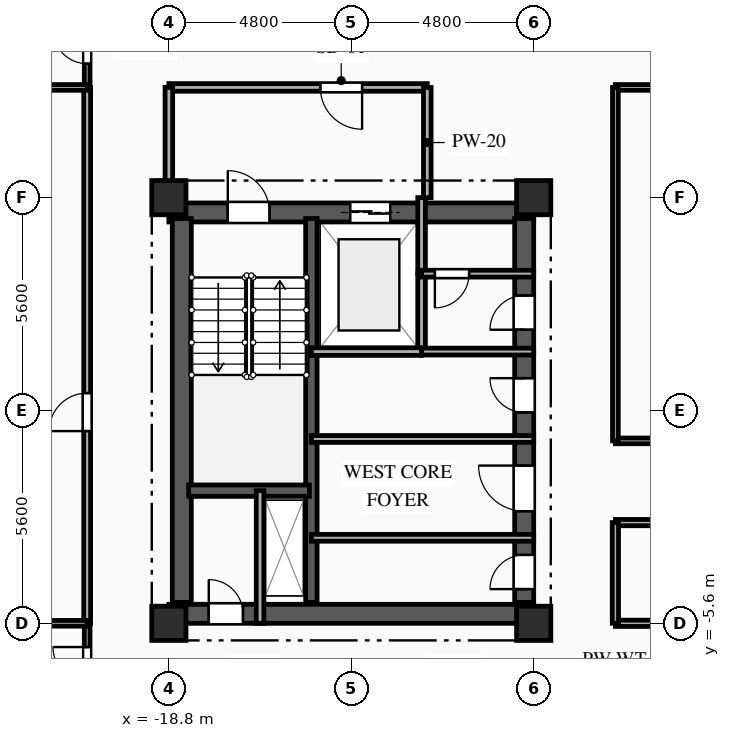
"""IFC4 building model, lengths in metres.
Left out: names, types, materials, properties, quantities, classifications, styles, units other than length and angle.
Written with IfcOpenShell. Run it as: python <this file> out.ifc"""

import sys

from ifc_helpers import new_model, si_unit, direction, frame, frame_2d, origin, origin_2d, place, context, subcontext, project, spatial, rectangle, extrude, element, fill, save


model = new_model("IFC4")
c1 = context("Model", 3, precision=1e-05, world=origin(), true_north=direction((0.0, 1.0)))
c2 = subcontext(c1, "Body", "Model", "MODEL_VIEW")
j1 = project(units=[si_unit("LENGTHUNIT", "METRE"), si_unit("PLANEANGLEUNIT", "RADIAN")], contexts=[c1])
p1 = place(None, origin())
s1 = spatial("IfcSite", under=j1, at=p1, CompositionType="ELEMENT")
p2 = place(p1, origin())
s2 = spatial("IfcBuilding", under=s1, at=p2, CompositionType="ELEMENT")
p3 = place(p2, frame((0.0, 0.0, 147.75)))
s3 = spatial("IfcBuildingStorey", under=s2, at=p3, CompositionType="ELEMENT", Elevation=147.75)
for number, where, z_axis, x_axis in (
    (1, (-18.8, -5.6, 0.0), (0.0, 0.0, 1.0), (1.0, 0.0, 0.0)),
    (2, (-18.8, 5.6, 0.0), (0.0, 0.0, 1.0), (1.0, 0.0, 0.0)),
    (3, (-9.2, -5.6, 0.0), (0.0, 0.0, 1.0), (1.0, 0.0, 0.0)),
    (4, (-9.2, 5.6, 0.0), (0.0, 0.0, 1.0), (1.0, 0.0, 0.0)),
):
    element("IfcColumn", number, at=place(p3, frame(where, z_axis=z_axis, x_axis=x_axis)), inside=s3, PredefinedType="COLUMN", context=c2, shape_type="SweptSolid", body=[
        extrude(rectangle(XDim=0.9, YDim=0.9, at=origin_2d()), origin(), (0.0, 0.0, 1.0), 3.35),
    ])
p4 = place(p3, frame((-18.8, 5.21, 0.0), z_axis=(0.0, 0.0, 1.0), x_axis=(1.0, 0.0, 0.0)))
e5 = element("IfcWall", 5, at=p4, inside=s3, PredefinedType="SHEAR", context=c2, shape_type="SweptSolid", body=[
    extrude(rectangle(XDim=9.6, YDim=0.5, at=frame_2d((4.8, 0.0))), origin(), (0.0, 0.0, 1.0), 3.04),
])
p5 = place(p4, frame((1.55, 0.0, 0.0)))
e6 = element("IfcOpeningElement", 6, at=p5, cuts=e5, PredefinedType="OPENING", context=c2, shape_type="SweptSolid", body=[
    extrude(rectangle(XDim=1.1, YDim=2.15, at=frame_2d((0.55, 1.075))), frame((0.0, 0.26, 0.0), z_axis=(0.0, -1.0, 0.0), x_axis=(1.0, 0.0, 0.0)), (0.0, 0.0, 1.0), 0.52),
])
p6 = place(p4, frame((4.775, 0.0, 0.0)))
e7 = element("IfcOpeningElement", 7, at=p6, cuts=e5, PredefinedType="OPENING", context=c2, shape_type="SweptSolid", body=[
    extrude(rectangle(XDim=1.05, YDim=2.1, at=frame_2d((0.525, 1.05))), frame((0.0, 0.26, 0.0), z_axis=(0.0, -1.0, 0.0), x_axis=(1.0, 0.0, 0.0)), (0.0, 0.0, 1.0), 0.52),
])
p7 = place(p3, frame((-18.8, -5.35, 0.0), z_axis=(0.0, 0.0, 1.0), x_axis=(1.0, 0.0, 0.0)))
e8 = element("IfcWall", 8, at=p7, inside=s3, PredefinedType="SHEAR", context=c2, shape_type="SweptSolid", body=[
    extrude(rectangle(XDim=9.6, YDim=0.5, at=frame_2d((4.8, 0.0))), origin(), (0.0, 0.0, 1.0), 3.04),
])
p8 = place(p7, frame((1.05, 0.0, 0.0)))
e9 = element("IfcOpeningElement", 9, at=p8, cuts=e8, PredefinedType="OPENING", context=c2, shape_type="SweptSolid", body=[
    extrude(rectangle(XDim=0.9, YDim=2.1, at=frame_2d((0.45, 1.05))), frame((0.0, 0.26, 0.0), z_axis=(0.0, -1.0, 0.0), x_axis=(1.0, 0.0, 0.0)), (0.0, 0.0, 1.0), 0.52),
])
p9 = place(p3, frame((-18.46, -5.05, 0.0), z_axis=(0.0, 0.0, 1.0), x_axis=(0.0, 1.0, 0.0)))
e10 = element("IfcWall", 10, at=p9, inside=s3, PredefinedType="SHEAR", context=c2, shape_type="SweptSolid", body=[
    extrude(rectangle(XDim=10.1, YDim=0.5, at=frame_2d((5.05, 0.0))), origin(), (0.0, 0.0, 1.0), 3.04),
])
p10 = place(p3, frame((-9.45, -5.05, 0.0), z_axis=(0.0, 0.0, 1.0), x_axis=(0.0, 1.0, 0.0)))
e11 = element("IfcWall", 11, at=p10, inside=s3, PredefinedType="SHEAR", context=c2, shape_type="SweptSolid", body=[
    extrude(rectangle(XDim=10.1, YDim=0.5, at=frame_2d((5.05, 0.0))), origin(), (0.0, 0.0, 1.0), 3.04),
])
p11 = place(p10, frame((7.175, 0.0, 0.0)))
e12 = element("IfcOpeningElement", 12, at=p11, cuts=e11, PredefinedType="OPENING", context=c2, shape_type="SweptSolid", body=[
    extrude(rectangle(XDim=0.9, YDim=2.1, at=frame_2d((0.45, 1.05))), frame((0.0, 0.26, 0.0), z_axis=(0.0, -1.0, 0.0), x_axis=(1.0, 0.0, 0.0)), (0.0, 0.0, 1.0), 0.52),
])
p12 = place(p10, frame((2.4, 0.0, 0.0)))
e13 = element("IfcOpeningElement", 13, at=p12, cuts=e11, PredefinedType="OPENING", context=c2, shape_type="SweptSolid", body=[
    extrude(rectangle(XDim=1.2, YDim=2.15, at=frame_2d((0.6, 1.075))), frame((0.0, 0.26, 0.0), z_axis=(0.0, -1.0, 0.0), x_axis=(1.0, 0.0, 0.0)), (0.0, 0.0, 1.0), 0.52),
])
p13 = place(p10, frame((0.35, 0.0, 0.0)))
e14 = element("IfcOpeningElement", 14, at=p13, cuts=e11, PredefinedType="OPENING", context=c2, shape_type="SweptSolid", body=[
    extrude(rectangle(XDim=0.9, YDim=2.1, at=frame_2d((0.45, 1.05))), frame((0.0, 0.26, 0.0), z_axis=(0.0, -1.0, 0.0), x_axis=(1.0, 0.0, 0.0)), (0.0, 0.0, 1.0), 0.52),
])
p14 = place(p10, frame((5.0, 0.0, 0.0)))
e15 = element("IfcOpeningElement", 15, at=p14, cuts=e11, PredefinedType="OPENING", context=c2, shape_type="SweptSolid", body=[
    extrude(rectangle(XDim=0.9, YDim=2.1, at=frame_2d((0.45, 1.05))), frame((0.0, 0.26, 0.0), z_axis=(0.0, -1.0, 0.0), x_axis=(1.0, 0.0, 0.0)), (0.0, 0.0, 1.0), 0.52),
])
p15 = place(p3, frame((-15.05, -5.05, 0.0), z_axis=(0.0, 0.0, 1.0), x_axis=(0.0, 1.0, 0.0)))
e16 = element("IfcWall", 16, at=p15, inside=s3, PredefinedType="SHEAR", context=c2, shape_type="SweptSolid", body=[
    extrude(rectangle(XDim=10.1, YDim=0.3, at=frame_2d((5.05, 0.0))), origin(), (0.0, 0.0, 1.0), 3.04),
])
p16 = place(p3, frame((-18.28, -2.11, 0.0), z_axis=(0.0, 0.0, 1.0), x_axis=(1.0, 0.0, 0.0)))
e17 = element("IfcWall", 17, at=p16, inside=s3, PredefinedType="SHEAR", context=c2, shape_type="SweptSolid", body=[
    extrude(rectangle(XDim=3.18, YDim=0.3, at=frame_2d((1.59, 0.0))), origin(), (0.0, 0.0, 1.0), 3.04),
])
p17 = place(p3, frame((-16.4, -5.6, 0.0), z_axis=(0.0, 0.0, 1.0), x_axis=(0.0, 1.0, 0.0)))
e18 = element("IfcWall", 18, at=p17, inside=s3, PredefinedType="PARTITIONING", context=c2, shape_type="SweptSolid", body=[
    extrude(rectangle(XDim=3.49, YDim=0.2, at=frame_2d((1.745, 0.0))), origin(), (0.0, 0.0, 1.0), 3.04),
])
p18 = place(p3, frame((-12.15, 1.55, 0.0), z_axis=(0.0, 0.0, 1.0), x_axis=(0.0, 1.0, 0.0)))
e19 = element("IfcWall", 19, at=p18, inside=s3, PredefinedType="PARTITIONING", context=c2, shape_type="SweptSolid", body=[
    extrude(rectangle(XDim=2.05, YDim=0.2, at=frame_2d((1.025, 0.0))), origin(), (0.0, 0.0, 1.0), 3.04),
])
p19 = place(p3, frame((-12.15, 3.6, 0.0), z_axis=(0.0, 0.0, 1.0), x_axis=(0.0, 1.0, 0.0)))
e20 = element("IfcWall", 20, at=p19, inside=s3, PredefinedType="PARTITIONING", context=c2, shape_type="SweptSolid", body=[
    extrude(rectangle(XDim=2.0, YDim=0.2, at=frame_2d((1.0, 0.0))), origin(), (0.0, 0.0, 1.0), 3.04),
])
p20 = place(p3, frame((-12.0, 8.5, 0.0), z_axis=(0.0, 0.0, 1.0), x_axis=(-1.0, 0.0, 0.0)))
e21 = element("IfcWall", 21, at=p20, inside=s3, PredefinedType="PARTITIONING", context=c2, shape_type="SweptSolid", body=[
    extrude(rectangle(XDim=6.8, YDim=0.2, at=frame_2d((3.4, 0.0))), origin(), (0.0, 0.0, 1.0), 3.04),
])
p21 = place(p20, frame((1.715, 0.0, 0.0)))
e22 = element("IfcOpeningElement", 22, at=p21, cuts=e21, PredefinedType="OPENING", context=c2, shape_type="SweptSolid", body=[
    extrude(rectangle(XDim=1.1, YDim=2.15, at=frame_2d((0.55, 1.075))), frame((0.0, 0.11, 0.0), z_axis=(0.0, -1.0, 0.0), x_axis=(1.0, 0.0, 0.0)), (0.0, 0.0, 1.0), 0.22),
])
p22 = place(p3, frame((-18.8, 8.5, 0.0), z_axis=(0.0, 0.0, 1.0), x_axis=(0.0, -1.0, 0.0)))
e23 = element("IfcWall", 23, at=p22, inside=s3, PredefinedType="PARTITIONING", context=c2, shape_type="SweptSolid", body=[
    extrude(rectangle(XDim=2.9, YDim=0.2, at=frame_2d((1.45, 0.0))), origin(), (0.0, 0.0, 1.0), 2.525),
])
p23 = place(p3, frame((-12.0, 5.6, 0.0), z_axis=(0.0, 0.0, 1.0), x_axis=(0.0, 1.0, 0.0)))
e24 = element("IfcWall", 24, at=p23, inside=s3, PredefinedType="PARTITIONING", context=c2, shape_type="SweptSolid", body=[
    extrude(rectangle(XDim=2.9, YDim=0.2, at=frame_2d((1.45, 0.0))), origin(), (0.0, 0.0, 1.0), 3.04),
])
p24 = place(p3, frame((-9.2, 3.6, 0.0), z_axis=(0.0, 0.0, 1.0), x_axis=(-1.0, 0.0, 0.0)))
e25 = element("IfcWall", 25, at=p24, inside=s3, PredefinedType="PARTITIONING", context=c2, shape_type="SweptSolid", body=[
    extrude(rectangle(XDim=2.95, YDim=0.18, at=frame_2d((1.475, 0.0))), origin(), (0.0, 0.0, 1.0), 3.04),
])
p25 = place(p24, frame((1.7, 0.0, 0.0)))
e26 = element("IfcOpeningElement", 26, at=p25, cuts=e25, PredefinedType="OPENING", context=c2, shape_type="SweptSolid", body=[
    extrude(rectangle(XDim=0.9, YDim=2.1, at=frame_2d((0.45, 1.05))), frame((0.0, 0.1, 0.0), z_axis=(0.0, -1.0, 0.0), x_axis=(1.0, 0.0, 0.0)), (0.0, 0.0, 1.0), 0.2),
])
p26 = place(p3, frame((-12.15, 1.55, 0.0), z_axis=(0.0, 0.0, 1.0), x_axis=(1.0, 0.0, 0.0)))
e27 = element("IfcWall", 27, at=p26, inside=s3, PredefinedType="PARTITIONING", context=c2, shape_type="SweptSolid", body=[
    extrude(rectangle(XDim=2.95, YDim=0.18, at=frame_2d((1.475, 0.0))), origin(), (0.0, 0.0, 1.0), 3.04),
])
p27 = place(p3, frame((-15.05, -3.35, 0.0), z_axis=(0.0, 0.0, 1.0), x_axis=(1.0, 0.0, 0.0)))
e28 = element("IfcWall", 28, at=p27, inside=s3, PredefinedType="PARTITIONING", context=c2, shape_type="SweptSolid", body=[
    extrude(rectangle(XDim=5.85, YDim=0.18, at=frame_2d((2.925, 0.0))), origin(), (0.0, 0.0, 1.0), 2.755),
])
p28 = place(p3, frame((-9.2, -0.75, 0.0), z_axis=(0.0, 0.0, 1.0), x_axis=(-1.0, 0.0, 0.0)))
e29 = element("IfcWall", 29, at=p28, inside=s3, PredefinedType="PARTITIONING", context=c2, shape_type="SweptSolid", body=[
    extrude(rectangle(XDim=5.85, YDim=0.18, at=frame_2d((2.925, 0.0))), origin(), (0.0, 0.0, 1.0), 3.04),
])
p29 = place(p3, frame((-20.95, 8.5, 0.0), z_axis=(0.0, 0.0, 1.0), x_axis=(0.0, 1.0, 0.0)))
e30 = element("IfcWall", 30, at=p29, inside=s3, PredefinedType="PARTITIONING", context=c2, shape_type="SweptSolid", body=[
    extrude(rectangle(XDim=2.15, YDim=0.15, at=frame_2d((1.075, 0.0))), origin(), (0.0, 0.0, 1.0), 3.04),
])
p30 = place(p29, frame((0.625, 0.0, 0.0)))
e31 = element("IfcOpeningElement", 31, at=p30, cuts=e30, PredefinedType="OPENING", context=c2, shape_type="SweptSolid", body=[
    extrude(rectangle(XDim=0.9, YDim=2.1, at=frame_2d((0.45, 1.05))), frame((0.0, 0.085, 0.0), z_axis=(0.0, -1.0, 0.0), x_axis=(1.0, 0.0, 0.0)), (0.0, 0.0, 1.0), 0.17),
])
p31 = place(p3, frame((0.0, 8.5, 0.0), z_axis=(0.0, 0.0, 1.0), x_axis=(-1.0, 0.0, 0.0)))
e32 = element("IfcWall", 32, at=p31, inside=s3, PredefinedType="PARTITIONING", context=c2, shape_type="SweptSolid", body=[
    extrude(rectangle(XDim=7.05, YDim=0.15, at=frame_2d((3.525, 0.0))), origin(), (0.0, 0.0, 1.0), 3.04),
])
p32 = place(p3, frame((-20.95, -7.75, 0.0), z_axis=(0.0, 0.0, 1.0), x_axis=(0.0, 1.0, 0.0)))
e33 = element("IfcWall", 33, at=p32, inside=s3, PredefinedType="PARTITIONING", context=c2, shape_type="SweptSolid", body=[
    extrude(rectangle(XDim=2.15, YDim=0.15, at=frame_2d((1.075, 0.0))), origin(), (0.0, 0.0, 1.0), 3.04),
])
p33 = place(p32, frame((0.625, 0.0, 0.0)))
e34 = element("IfcOpeningElement", 34, at=p33, cuts=e33, PredefinedType="OPENING", context=c2, shape_type="SweptSolid", body=[
    extrude(rectangle(XDim=0.9, YDim=2.1, at=frame_2d((0.45, 1.05))), frame((0.0, 0.085, 0.0), z_axis=(0.0, -1.0, 0.0), x_axis=(1.0, 0.0, 0.0)), (0.0, 0.0, 1.0), 0.17),
])
p34 = place(p3, frame((-7.05, -5.6, 0.0), z_axis=(0.0, 0.0, 1.0), x_axis=(1.0, 0.0, 0.0)))
e35 = element("IfcWall", 35, at=p34, inside=s3, PredefinedType="PARTITIONING", context=c2, shape_type="SweptSolid", body=[
    extrude(rectangle(XDim=7.05, YDim=0.165, at=frame_2d((3.525, 0.0))), origin(), (0.0, 0.0, 1.0), 2.525),
])
p35 = place(p3, frame((-20.95, -5.6, 0.0), z_axis=(0.0, 0.0, 1.0), x_axis=(0.0, 1.0, 0.0)))
e36 = element("IfcWall", 36, at=p35, inside=s3, PredefinedType="PARTITIONING", context=c2, shape_type="SweptSolid", body=[
    extrude(rectangle(XDim=14.1, YDim=0.18, at=frame_2d((7.05, 0.0))), origin(), (0.0, 0.0, 1.0), 3.04),
])
p36 = place(p35, frame((5.058, 0.0, 0.0)))
e37 = element("IfcOpeningElement", 37, at=p36, cuts=e36, PredefinedType="OPENING", context=c2, shape_type="SweptSolid", body=[
    extrude(rectangle(XDim=1.0, YDim=2.15, at=frame_2d((0.5, 1.075))), frame((0.0, 0.1, 0.0), z_axis=(0.0, -1.0, 0.0), x_axis=(1.0, 0.0, 0.0)), (0.0, 0.0, 1.0), 0.2),
])
p37 = place(p3, frame((-7.05, -0.8, 0.0), z_axis=(0.0, 0.0, 1.0), x_axis=(1.0, 0.0, 0.0)))
e38 = element("IfcWall", 38, at=p37, inside=s3, PredefinedType="PARTITIONING", context=c2, shape_type="SweptSolid", body=[
    extrude(rectangle(XDim=14.1, YDim=0.15, at=frame_2d((7.05, 0.0))), origin(), (0.0, 0.0, 1.0), 3.04),
])
p38 = place(p37, frame((6.525, 0.0, 0.0)))
e39 = element("IfcOpeningElement", 39, at=p38, cuts=e38, PredefinedType="OPENING", context=c2, shape_type="SweptSolid", body=[
    extrude(rectangle(XDim=1.05, YDim=2.15, at=frame_2d((0.525, 1.075))), frame((0.0, 0.085, 0.0), z_axis=(0.0, -1.0, 0.0), x_axis=(1.0, 0.0, 0.0)), (0.0, 0.0, 1.0), 0.17),
])
p39 = place(p3, frame((7.05, -2.95, 0.0), z_axis=(0.0, 0.0, 1.0), x_axis=(-1.0, 0.0, 0.0)))
e40 = element("IfcWall", 40, at=p39, inside=s3, PredefinedType="PARTITIONING", context=c2, shape_type="SweptSolid", body=[
    extrude(rectangle(XDim=14.1, YDim=0.165, at=frame_2d((7.05, 0.0))), origin(), (0.0, 0.0, 1.0), 3.04),
])
p40 = place(p39, frame((6.475, 0.0, 0.0)))
e41 = element("IfcOpeningElement", 41, at=p40, cuts=e40, PredefinedType="OPENING", context=c2, shape_type="SweptSolid", body=[
    extrude(rectangle(XDim=1.15, YDim=2.15, at=frame_2d((0.575, 1.075))), frame((0.0, 0.093, 0.0), z_axis=(0.0, -1.0, 0.0), x_axis=(1.0, 0.0, 0.0)), (0.0, 0.0, 1.0), 0.185),
])
p41 = place(p3, frame((-7.05, 8.5, 0.0), z_axis=(0.0, 0.0, 1.0), x_axis=(0.0, -1.0, 0.0)))
e42 = element("IfcWall", 42, at=p41, inside=s3, PredefinedType="PARTITIONING", context=c2, shape_type="SweptSolid", body=[
    extrude(rectangle(XDim=9.3, YDim=0.15, at=frame_2d((4.65, 0.0))), origin(), (0.0, 0.0, 1.0), 3.04),
])
p42 = place(p3, frame((-7.05, -2.95, 0.0), z_axis=(0.0, 0.0, 1.0), x_axis=(0.0, -1.0, 0.0)))
e43 = element("IfcWall", 43, at=p42, inside=s3, PredefinedType="PARTITIONING", context=c2, shape_type="SweptSolid", body=[
    extrude(rectangle(XDim=2.65, YDim=0.165, at=frame_2d((1.325, 0.0))), origin(), (0.0, 0.0, 1.0), 3.04),
])
p43 = place(p3, frame((-23.6, 8.5, 0.0), z_axis=(0.0, 0.0, 1.0), x_axis=(1.0, 0.0, 0.0)))
e44 = element("IfcWall", 44, at=p43, inside=s3, PredefinedType="PARTITIONING", context=c2, shape_type="SweptSolid", body=[
    extrude(rectangle(XDim=2.65, YDim=0.15, at=frame_2d((1.325, 0.0))), origin(), (0.0, 0.0, 1.0), 3.04),
])
p44 = place(p43, frame((0.635, 0.0, 0.0)))
e45 = element("IfcOpeningElement", 45, at=p44, cuts=e44, PredefinedType="OPENING", context=c2, shape_type="SweptSolid", body=[
    extrude(rectangle(XDim=1.05, YDim=2.15, at=frame_2d((0.525, 1.075))), frame((0.0, 0.085, 0.0), z_axis=(0.0, -1.0, 0.0), x_axis=(1.0, 0.0, 0.0)), (0.0, 0.0, 1.0), 0.17),
])
p45 = place(p3, frame((-20.95, -5.6, 0.0), z_axis=(0.0, 0.0, 1.0), x_axis=(-1.0, 0.0, 0.0)))
e46 = element("IfcWall", 46, at=p45, inside=s3, PredefinedType="PARTITIONING", context=c2, shape_type="SweptSolid", body=[
    extrude(rectangle(XDim=2.65, YDim=0.15, at=frame_2d((1.325, 0.0))), origin(), (0.0, 0.0, 1.0), 3.04),
])
p46 = place(p45, frame((0.965, 0.0, 0.0)))
e47 = element("IfcOpeningElement", 47, at=p46, cuts=e46, PredefinedType="OPENING", context=c2, shape_type="SweptSolid", body=[
    extrude(rectangle(XDim=1.05, YDim=2.15, at=frame_2d((0.525, 1.075))), frame((0.0, 0.085, 0.0), z_axis=(0.0, -1.0, 0.0), x_axis=(1.0, 0.0, 0.0)), (0.0, 0.0, 1.0), 0.17),
])
p47 = place(p3, frame((-15.05, 1.55, 0.0), z_axis=(0.0, 0.0, 1.0), x_axis=(1.0, 0.0, 0.0)))
e48 = element("IfcWall", 48, at=p47, inside=s3, PredefinedType="PARTITIONING", context=c2, shape_type="SweptSolid", body=[
    extrude(rectangle(XDim=2.9, YDim=0.2, at=frame_2d((1.45, 0.0))), origin(), (0.0, 0.0, 1.0), 3.04),
])
p48 = place(p5, origin())
e49 = element("IfcDoor", 49, at=p48, inside=s3, OperationType="SINGLE_SWING_LEFT", PredefinedType="DOOR", context=c2, shape_type="SweptSolid", body=[
    extrude(rectangle(XDim=1.1, YDim=2.15, at=frame_2d((0.55, 1.075))), frame((0.0, 0.025, 0.0), z_axis=(0.0, -1.0, 0.0), x_axis=(1.0, 0.0, 0.0)), (0.0, 0.0, 1.0), 0.05),
])
fill(e6, e49)
p49 = place(p6, origin())
e50 = element("IfcDoor", 50, at=p49, inside=s3, OperationType="DOUBLE_DOOR_SLIDING", PredefinedType="DOOR", context=c2, shape_type="SweptSolid", body=[
    extrude(rectangle(XDim=1.05, YDim=2.1, at=frame_2d((0.525, 1.05))), frame((0.0, 0.025, 0.0), z_axis=(0.0, -1.0, 0.0), x_axis=(1.0, 0.0, 0.0)), (0.0, 0.0, 1.0), 0.05),
])
fill(e7, e50)
p50 = place(p8, origin())
e51 = element("IfcDoor", 51, at=p50, inside=s3, OperationType="SINGLE_SWING_LEFT", PredefinedType="DOOR", context=c2, shape_type="SweptSolid", body=[
    extrude(rectangle(XDim=0.9, YDim=2.1, at=frame_2d((0.45, 1.05))), frame((0.0, 0.025, 0.0), z_axis=(0.0, -1.0, 0.0), x_axis=(1.0, 0.0, 0.0)), (0.0, 0.0, 1.0), 0.05),
])
fill(e9, e51)
p51 = place(p21, origin())
e52 = element("IfcDoor", 52, at=p51, inside=s3, OperationType="SINGLE_SWING_LEFT", PredefinedType="DOOR", context=c2, shape_type="SweptSolid", body=[
    extrude(rectangle(XDim=1.1, YDim=2.15, at=frame_2d((0.55, 1.075))), frame((0.0, 0.025, 0.0), z_axis=(0.0, -1.0, 0.0), x_axis=(1.0, 0.0, 0.0)), (0.0, 0.0, 1.0), 0.05),
])
fill(e22, e52)
p52 = place(p25, origin())
e53 = element("IfcDoor", 53, at=p52, inside=s3, OperationType="SINGLE_SWING_RIGHT", PredefinedType="DOOR", context=c2, shape_type="SweptSolid", body=[
    extrude(rectangle(XDim=0.9, YDim=2.1, at=frame_2d((0.45, 1.05))), frame((0.0, 0.025, 0.0), z_axis=(0.0, -1.0, 0.0), x_axis=(1.0, 0.0, 0.0)), (0.0, 0.0, 1.0), 0.05),
])
fill(e26, e53)
p53 = place(p11, origin())
e54 = element("IfcDoor", 54, at=p53, inside=s3, OperationType="SINGLE_SWING_LEFT", PredefinedType="DOOR", context=c2, shape_type="SweptSolid", body=[
    extrude(rectangle(XDim=0.9, YDim=2.1, at=frame_2d((0.45, 1.05))), frame((0.0, 0.025, 0.0), z_axis=(0.0, -1.0, 0.0), x_axis=(1.0, 0.0, 0.0)), (0.0, 0.0, 1.0), 0.05),
])
fill(e12, e54)
p54 = place(p12, origin())
e55 = element("IfcDoor", 55, at=p54, inside=s3, OperationType="SINGLE_SWING_RIGHT", PredefinedType="DOOR", context=c2, shape_type="SweptSolid", body=[
    extrude(rectangle(XDim=1.2, YDim=2.15, at=frame_2d((0.6, 1.075))), frame((0.0, 0.025, 0.0), z_axis=(0.0, -1.0, 0.0), x_axis=(1.0, 0.0, 0.0)), (0.0, 0.0, 1.0), 0.05),
])
fill(e13, e55)
p55 = place(p13, origin())
e56 = element("IfcDoor", 56, at=p55, inside=s3, OperationType="SINGLE_SWING_LEFT", PredefinedType="DOOR", context=c2, shape_type="SweptSolid", body=[
    extrude(rectangle(XDim=0.9, YDim=2.1, at=frame_2d((0.45, 1.05))), frame((0.0, 0.025, 0.0), z_axis=(0.0, -1.0, 0.0), x_axis=(1.0, 0.0, 0.0)), (0.0, 0.0, 1.0), 0.05),
])
fill(e14, e56)
p56 = place(p14, origin())
e57 = element("IfcDoor", 57, at=p56, inside=s3, OperationType="SINGLE_SWING_RIGHT", PredefinedType="DOOR", context=c2, shape_type="SweptSolid", body=[
    extrude(rectangle(XDim=0.9, YDim=2.1, at=frame_2d((0.45, 1.05))), frame((0.0, 0.025, 0.0), z_axis=(0.0, -1.0, 0.0), x_axis=(1.0, 0.0, 0.0)), (0.0, 0.0, 1.0), 0.05),
])
fill(e15, e57)
p57 = place(p30, origin())
e58 = element("IfcDoor", 58, at=p57, inside=s3, OperationType="SINGLE_SWING_RIGHT", PredefinedType="DOOR", context=c2, shape_type="SweptSolid", body=[
    extrude(rectangle(XDim=0.9, YDim=2.1, at=frame_2d((0.45, 1.05))), frame((0.0, 0.025, 0.0), z_axis=(0.0, -1.0, 0.0), x_axis=(1.0, 0.0, 0.0)), (0.0, 0.0, 1.0), 0.05),
])
fill(e31, e58)
p58 = place(p33, origin())
e59 = element("IfcDoor", 59, at=p58, inside=s3, OperationType="SINGLE_SWING_RIGHT", PredefinedType="DOOR", context=c2, shape_type="SweptSolid", body=[
    extrude(rectangle(XDim=0.9, YDim=2.1, at=frame_2d((0.45, 1.05))), frame((0.0, 0.025, 0.0), z_axis=(0.0, -1.0, 0.0), x_axis=(1.0, 0.0, 0.0)), (0.0, 0.0, 1.0), 0.05),
])
fill(e34, e59)
p59 = place(p36, origin())
e60 = element("IfcDoor", 60, at=p59, inside=s3, OperationType="SINGLE_SWING_LEFT", PredefinedType="DOOR", context=c2, shape_type="SweptSolid", body=[
    extrude(rectangle(XDim=1.0, YDim=2.15, at=frame_2d((0.5, 1.075))), frame((0.0, 0.025, 0.0), z_axis=(0.0, -1.0, 0.0), x_axis=(1.0, 0.0, 0.0)), (0.0, 0.0, 1.0), 0.05),
])
fill(e37, e60)
save(model, sys.argv[1])
